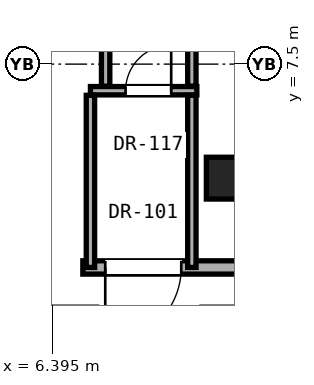
"""IFC4 building model, lengths in metres.
Left out: names, types, materials, properties, quantities, classifications, styles, units other than length and angle.
Written with IfcOpenShell. Run it as: python <this file> out.ifc"""

import sys

from ifc_helpers import new_model, si_unit, direction, frame, frame_2d, origin, origin_2d, place, context, subcontext, project, spatial, rectangle, extrude, element, fill, save


model = new_model("IFC4")
c1 = context("Model", 3, precision=1e-05, world=origin(), true_north=direction((0.0, 1.0)))
c2 = subcontext(c1, "Body", "Model", "MODEL_VIEW")
j1 = project(units=[si_unit("LENGTHUNIT", "METRE"), si_unit("PLANEANGLEUNIT", "RADIAN")], contexts=[c1])
p1 = place(None, origin())
s1 = spatial("IfcSite", under=j1, at=p1, CompositionType="ELEMENT")
p2 = place(p1, origin())
s2 = spatial("IfcBuilding", under=s1, at=p2, CompositionType="ELEMENT")
p3 = place(p2, origin())
s3 = spatial("IfcBuildingStorey", under=s2, at=p3, CompositionType="ELEMENT", Elevation=0.0)
p4 = place(p3, frame((11.0, 4.5, 0.0), z_axis=(0.0, 0.0, 1.0), x_axis=(1.0, 0.0, 0.0)))
e1 = element("IfcColumn", 1, at=p4, inside=s3, PredefinedType="COLUMN", context=c2, shape_type="SweptSolid", body=[
    extrude(rectangle(XDim=1.1, YDim=1.1, at=origin_2d()), origin(), (0.0, 0.0, 1.0), 5.2),
])
p5 = place(p3, frame((34.2, 2.15, 0.0), z_axis=(0.0, 0.0, 1.0), x_axis=(-1.0, 0.0, 0.0)))
e2 = element("IfcWall", 2, at=p5, inside=s3, PredefinedType="SOLIDWALL", context=c2, shape_type="SweptSolid", body=[
    extrude(rectangle(XDim=27.0, YDim=0.35, at=frame_2d((13.5, 0.0))), origin(), (0.0, 0.0, 1.0), 4.86),
])
p6 = place(p5, frame((6.0, 0.0, 0.85)))
e3 = element("IfcOpeningElement", 3, at=p6, cuts=e2, PredefinedType="OPENING", context=c2, shape_type="SweptSolid", body=[
    extrude(rectangle(XDim=2.4, YDim=2.6, at=frame_2d((1.2, 1.3))), frame((0.0, 0.185, 0.0), z_axis=(0.0, -1.0, 0.0), x_axis=(1.0, 0.0, 0.0)), (0.0, 0.0, 1.0), 0.37),
])
p7 = place(p5, frame((19.8, 0.0, 0.85)))
e4 = element("IfcOpeningElement", 4, at=p7, cuts=e2, PredefinedType="OPENING", context=c2, shape_type="SweptSolid", body=[
    extrude(rectangle(XDim=1.8, YDim=2.4, at=frame_2d((0.9, 1.2))), frame((0.0, 0.185, 0.0), z_axis=(0.0, -1.0, 0.0), x_axis=(1.0, 0.0, 0.0)), (0.0, 0.0, 1.0), 0.37),
])
p8 = place(p5, frame((1.6, 0.0, 0.0)))
e5 = element("IfcOpeningElement", 5, at=p8, cuts=e2, PredefinedType="OPENING", context=c2, shape_type="SweptSolid", body=[
    extrude(rectangle(XDim=1.8, YDim=2.5, at=frame_2d((0.9, 1.25))), frame((0.0, 0.185, 0.0), z_axis=(0.0, -1.0, 0.0), x_axis=(1.0, 0.0, 0.0)), (0.0, 0.0, 1.0), 0.37),
])
p9 = place(p5, frame((15.2, 0.0, 0.0)))
e6 = element("IfcOpeningElement", 6, at=p9, cuts=e2, PredefinedType="OPENING", context=c2, shape_type="SweptSolid", body=[
    extrude(rectangle(XDim=2.0, YDim=2.4, at=frame_2d((1.0, 1.2))), frame((0.0, 0.185, 0.0), z_axis=(0.0, -1.0, 0.0), x_axis=(1.0, 0.0, 0.0)), (0.0, 0.0, 1.0), 0.37),
])
p10 = place(p5, frame((24.41, 0.0, 0.0)))
e7 = element("IfcOpeningElement", 7, at=p10, cuts=e2, PredefinedType="OPENING", context=c2, shape_type="SweptSolid", body=[
    extrude(rectangle(XDim=2.0, YDim=2.4, at=frame_2d((1.0, 1.2))), frame((0.0, 0.185, 0.0), z_axis=(0.0, -1.0, 0.0), x_axis=(1.0, 0.0, 0.0)), (0.0, 0.0, 1.0), 0.37),
])
p11 = place(p3, frame((7.4, 6.8, 0.0), z_axis=(0.0, 0.0, 1.0), x_axis=(1.0, 0.0, 0.0)))
e8 = element("IfcWall", 8, at=p11, inside=s3, PredefinedType="SOLIDWALL", context=c2, shape_type="SweptSolid", body=[
    extrude(rectangle(XDim=2.8, YDim=0.22, at=frame_2d((1.4, 0.0))), origin(), (0.0, 0.0, 1.0), 4.88),
])
p12 = place(p11, frame((0.925, 0.0, 0.0)))
e9 = element("IfcOpeningElement", 9, at=p12, cuts=e8, PredefinedType="OPENING", context=c2, shape_type="SweptSolid", body=[
    extrude(rectangle(XDim=1.2, YDim=2.25, at=frame_2d((0.6, 1.125))), frame((0.0, 0.12, 0.0), z_axis=(0.0, -1.0, 0.0), x_axis=(1.0, 0.0, 0.0)), (0.0, 0.0, 1.0), 0.24),
])
p13 = place(p3, frame((7.4, 2.15, 0.0), z_axis=(0.0, 0.0, 1.0), x_axis=(0.0, 1.0, 0.0)))
e10 = element("IfcWall", 10, at=p13, inside=s3, PredefinedType="SOLIDWALL", context=c2, shape_type="SweptSolid", body=[
    extrude(rectangle(XDim=4.53, YDim=0.22, at=frame_2d((2.265, 0.0))), origin(), (0.0, 0.0, 1.0), 4.88),
])
p14 = place(p3, frame((7.8, 6.92, 0.0), z_axis=(0.0, 0.0, 1.0), x_axis=(0.0, 1.0, 0.0)))
e11 = element("IfcWall", 11, at=p14, inside=s3, PredefinedType="SOLIDWALL", context=c2, shape_type="SweptSolid", body=[
    extrude(rectangle(XDim=39.98, YDim=0.22, at=frame_2d((19.99, 0.0))), origin(), (0.0, 0.0, 1.0), 3.772),
])
p15 = place(p3, frame((10.069, 2.15, 0.0), z_axis=(0.0, 0.0, 1.0), x_axis=(0.0, 1.0, 0.0)))
e12 = element("IfcWall", 12, at=p15, inside=s3, PredefinedType="SOLIDWALL", context=c2, shape_type="SweptSolid", body=[
    extrude(rectangle(XDim=4.53, YDim=0.22, at=frame_2d((2.265, 0.0))), origin(), (0.0, 0.0, 1.0), 4.88),
])
p16 = place(p3, frame((10.069, 6.92, 0.0), z_axis=(0.0, 0.0, 1.0), x_axis=(0.0, 1.0, 0.0)))
e13 = element("IfcWall", 13, at=p16, inside=s3, PredefinedType="SOLIDWALL", context=c2, shape_type="SweptSolid", body=[
    extrude(rectangle(XDim=3.795, YDim=0.22, at=frame_2d((1.897, 0.0))), origin(), (0.0, 0.0, 1.0), 4.88),
])
p17 = place(p10, origin())
e14 = element("IfcDoor", 14, at=p17, inside=s3, OperationType="SINGLE_SWING_RIGHT", PredefinedType="DOOR", context=c2, shape_type="SweptSolid", body=[
    extrude(rectangle(XDim=2.0, YDim=2.4, at=frame_2d((1.0, 1.2))), frame((0.0, 0.025, 0.0), z_axis=(0.0, -1.0, 0.0), x_axis=(1.0, 0.0, 0.0)), (0.0, 0.0, 1.0), 0.05),
])
fill(e7, e14)
p18 = place(p12, origin())
e15 = element("IfcDoor", 15, at=p18, inside=s3, OperationType="SINGLE_SWING_RIGHT", PredefinedType="DOOR", context=c2, shape_type="SweptSolid", body=[
    extrude(rectangle(XDim=1.2, YDim=2.25, at=frame_2d((0.6, 1.125))), frame((0.0, 0.025, 0.0), z_axis=(0.0, -1.0, 0.0), x_axis=(1.0, 0.0, 0.0)), (0.0, 0.0, 1.0), 0.05),
])
fill(e9, e15)
save(model, sys.argv[1])
